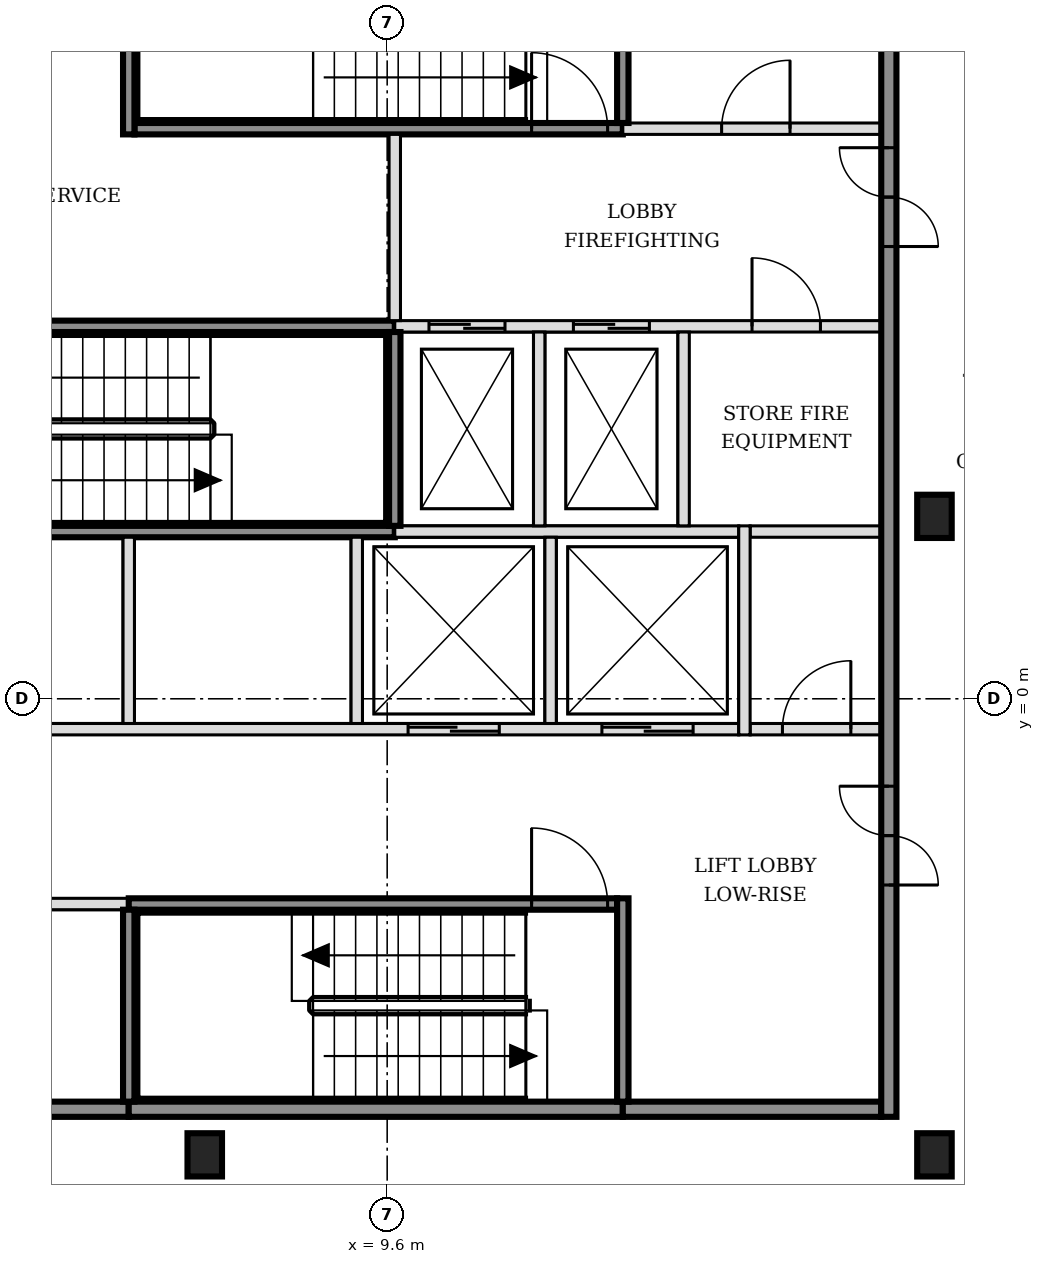
"""IFC4 building model, lengths in metres.
Left out: names, types, materials, properties, quantities, classifications, styles, units other than length and angle.
Written with IfcOpenShell. Run it as: python <this file> out.ifc"""

import sys

from ifc_helpers import new_model, si_unit, direction, frame, frame_2d, origin, origin_2d, place, context, subcontext, project, spatial, rectangle, i_section, extrude, element, fill, save


model = new_model("IFC4")
c1 = context("Model", 3, precision=1e-05, world=origin(), true_north=direction((0.0, 1.0)))
c2 = subcontext(c1, "Body", "Model", "MODEL_VIEW")
j1 = project(units=[si_unit("LENGTHUNIT", "METRE"), si_unit("PLANEANGLEUNIT", "RADIAN")], contexts=[c1])
p1 = place(None, origin())
s1 = spatial("IfcSite", under=j1, at=p1, CompositionType="ELEMENT")
p2 = place(p1, origin())
s2 = spatial("IfcBuilding", under=s1, at=p2, CompositionType="ELEMENT")
p3 = place(p2, frame((0.0, 0.0, 54.6)))
s3 = spatial("IfcBuildingStorey", under=s2, at=p3, CompositionType="ELEMENT", Elevation=54.6)
for number, where, z_axis, x_axis in (
    (1, (7.2, -6.0, -0.15), (0.0, 0.0, 1.0), (1.0, 0.0, 0.0)),
    (2, (16.8, -6.0, -0.15), (0.0, 0.0, 1.0), (1.0, 0.0, 0.0)),
    (3, (16.8, 2.4, -0.15), (0.0, 0.0, 1.0), (1.0, 0.0, 0.0)),
):
    element("IfcColumn", number, at=place(p3, frame(where, z_axis=z_axis, x_axis=x_axis)), inside=s3, PredefinedType="COLUMN", context=c2, shape_type="SweptSolid", body=[
        extrude(i_section(OverallWidth=0.454, OverallDepth=0.569, WebThickness=0.078, FlangeThickness=0.125, FilletRadius=0.015, at=origin_2d()), origin(), (0.0, 0.0, 1.0), 3.6),
    ])
p4 = place(p3, frame((-1.7, -5.4, 0.0), z_axis=(0.0, 0.0, 1.0), x_axis=(1.0, 0.0, 0.0)))
e4 = element("IfcWall", 4, at=p4, inside=s3, PredefinedType="SOLIDWALL", context=c2, shape_type="SweptSolid", body=[
    extrude(rectangle(XDim=7.9, YDim=0.2, at=frame_2d((3.95, 0.0))), origin(), (0.0, 0.0, 1.0), 3.45),
])
p5 = place(p3, frame((6.2, -5.4, 0.0), z_axis=(0.0, 0.0, 1.0), x_axis=(1.0, 0.0, 0.0)))
e5 = element("IfcWall", 5, at=p5, inside=s3, PredefinedType="SOLIDWALL", context=c2, shape_type="SweptSolid", body=[
    extrude(rectangle(XDim=6.5, YDim=0.2, at=frame_2d((3.25, 0.0))), origin(), (0.0, 0.0, 1.0), 3.45),
])
p6 = place(p3, frame((12.7, -5.4, 0.0), z_axis=(0.0, 0.0, 1.0), x_axis=(1.0, 0.0, 0.0)))
e6 = element("IfcWall", 6, at=p6, inside=s3, PredefinedType="SOLIDWALL", context=c2, shape_type="SweptSolid", body=[
    extrude(rectangle(XDim=3.4, YDim=0.2, at=frame_2d((1.7, 0.0))), origin(), (0.0, 0.0, 1.0), 3.45),
])
p7 = place(p3, frame((-1.7, -2.7, 0.0), z_axis=(0.0, 0.0, 1.0), x_axis=(1.0, 0.0, 0.0)))
e7 = element("IfcWall", 7, at=p7, inside=s3, PredefinedType="SOLIDWALL", context=c2, shape_type="SweptSolid", body=[
    extrude(rectangle(XDim=7.9, YDim=0.15, at=frame_2d((3.95, 0.0))), origin(), (0.0, 0.0, 1.0), 3.45),
])
p8 = place(p7, frame((0.6, 0.0, 0.0)))
e8 = element("IfcOpeningElement", 8, at=p8, cuts=e7, PredefinedType="OPENING", context=c2, shape_type="SweptSolid", body=[
    extrude(rectangle(XDim=1.1, YDim=2.1, at=frame_2d((0.55, 1.05))), frame((0.0, 0.085, 0.0), z_axis=(0.0, -1.0, 0.0), x_axis=(1.0, 0.0, 0.0)), (0.0, 0.0, 1.0), 0.17),
])
p9 = place(p7, frame((3.1, 0.0, 0.0)))
e9 = element("IfcOpeningElement", 9, at=p9, cuts=e7, PredefinedType="OPENING", context=c2, shape_type="SweptSolid", body=[
    extrude(rectangle(XDim=1.1, YDim=2.1, at=frame_2d((0.55, 1.05))), frame((0.0, 0.085, 0.0), z_axis=(0.0, -1.0, 0.0), x_axis=(1.0, 0.0, 0.0)), (0.0, 0.0, 1.0), 0.17),
])
p10 = place(p3, frame((6.2, -2.7, 0.0), z_axis=(0.0, 0.0, 1.0), x_axis=(1.0, 0.0, 0.0)))
e10 = element("IfcWall", 10, at=p10, inside=s3, PredefinedType="SOLIDWALL", context=c2, shape_type="SweptSolid", body=[
    extrude(rectangle(XDim=6.425, YDim=0.15, at=frame_2d((3.212, 0.0))), origin(), (0.0, 0.0, 1.0), 3.45),
])
p11 = place(p10, frame((5.3, 0.0, 0.0)))
e11 = element("IfcOpeningElement", 11, at=p11, cuts=e10, PredefinedType="OPENING", context=c2, shape_type="SweptSolid", body=[
    extrude(rectangle(XDim=1.0, YDim=2.1, at=frame_2d((0.5, 1.05))), frame((0.0, 0.085, 0.0), z_axis=(0.0, -1.0, 0.0), x_axis=(1.0, 0.0, 0.0)), (0.0, 0.0, 1.0), 0.17),
])
p12 = place(p3, frame((-1.7, -0.4, 0.0), z_axis=(0.0, 0.0, 1.0), x_axis=(1.0, 0.0, 0.0)))
e12 = element("IfcWall", 12, at=p12, inside=s3, PredefinedType="SOLIDWALL", context=c2, shape_type="SweptSolid", body=[
    extrude(rectangle(XDim=15.925, YDim=0.15, at=frame_2d((7.962, 0.0))), origin(), (0.0, 0.0, 1.0), 3.45),
])
p13 = place(p12, frame((0.6, 0.0, 0.0)))
e13 = element("IfcOpeningElement", 13, at=p13, cuts=e12, PredefinedType="OPENING", context=c2, shape_type="SweptSolid", body=[
    extrude(rectangle(XDim=1.1, YDim=2.1, at=frame_2d((0.55, 1.05))), frame((0.0, 0.085, 0.0), z_axis=(0.0, -1.0, 0.0), x_axis=(1.0, 0.0, 0.0)), (0.0, 0.0, 1.0), 0.17),
])
p14 = place(p12, frame((3.1, 0.0, 0.0)))
e14 = element("IfcOpeningElement", 14, at=p14, cuts=e12, PredefinedType="OPENING", context=c2, shape_type="SweptSolid", body=[
    extrude(rectangle(XDim=1.1, YDim=2.1, at=frame_2d((0.55, 1.05))), frame((0.0, 0.085, 0.0), z_axis=(0.0, -1.0, 0.0), x_axis=(1.0, 0.0, 0.0)), (0.0, 0.0, 1.0), 0.17),
])
p15 = place(p12, frame((11.575, 0.0, 0.0)))
e15 = element("IfcOpeningElement", 15, at=p15, cuts=e12, PredefinedType="OPENING", context=c2, shape_type="SweptSolid", body=[
    extrude(rectangle(XDim=1.2, YDim=2.1, at=frame_2d((0.6, 1.05))), frame((0.0, 0.085, 0.0), z_axis=(0.0, -1.0, 0.0), x_axis=(1.0, 0.0, 0.0)), (0.0, 0.0, 1.0), 0.17),
])
p16 = place(p12, frame((14.125, 0.0, 0.0)))
e16 = element("IfcOpeningElement", 16, at=p16, cuts=e12, PredefinedType="OPENING", context=c2, shape_type="SweptSolid", body=[
    extrude(rectangle(XDim=1.2, YDim=2.1, at=frame_2d((0.6, 1.05))), frame((0.0, 0.085, 0.0), z_axis=(0.0, -1.0, 0.0), x_axis=(1.0, 0.0, 0.0)), (0.0, 0.0, 1.0), 0.17),
])
p17 = place(p3, frame((14.375, -0.4, 0.0), z_axis=(0.0, 0.0, 1.0), x_axis=(1.0, 0.0, 0.0)))
e17 = element("IfcWall", 17, at=p17, inside=s3, PredefinedType="PARTITIONING", context=c2, shape_type="SweptSolid", body=[
    extrude(rectangle(XDim=1.725, YDim=0.15, at=frame_2d((0.863, 0.0))), origin(), (0.0, 0.0, 1.0), 3.45),
])
p18 = place(p17, frame((0.425, 0.0, 0.0)))
e18 = element("IfcOpeningElement", 18, at=p18, cuts=e17, PredefinedType="OPENING", context=c2, shape_type="SweptSolid", body=[
    extrude(rectangle(XDim=0.9, YDim=2.1, at=frame_2d((0.45, 1.05))), frame((0.0, 0.085, 0.0), z_axis=(0.0, -1.0, 0.0), x_axis=(1.0, 0.0, 0.0)), (0.0, 0.0, 1.0), 0.17),
])
p19 = place(p3, frame((3.2, 2.2, 0.0), z_axis=(0.0, 0.0, 1.0), x_axis=(1.0, 0.0, 0.0)))
e19 = element("IfcWall", 19, at=p19, inside=s3, PredefinedType="SOLIDWALL", context=c2, shape_type="SweptSolid", body=[
    extrude(rectangle(XDim=6.5, YDim=0.15, at=frame_2d((3.25, 0.0))), origin(), (0.0, 0.0, 1.0), 3.45),
])
p20 = place(p3, frame((9.7, 2.2, 0.0), z_axis=(0.0, 0.0, 1.0), x_axis=(1.0, 0.0, 0.0)))
e20 = element("IfcWall", 20, at=p20, inside=s3, PredefinedType="SOLIDWALL", context=c2, shape_type="SweptSolid", body=[
    extrude(rectangle(XDim=4.525, YDim=0.15, at=frame_2d((2.263, 0.0))), origin(), (0.0, 0.0, 1.0), 3.45),
])
p21 = place(p3, frame((14.375, 2.2, 0.0), z_axis=(0.0, 0.0, 1.0), x_axis=(1.0, 0.0, 0.0)))
e21 = element("IfcWall", 21, at=p21, inside=s3, PredefinedType="PARTITIONING", context=c2, shape_type="SweptSolid", body=[
    extrude(rectangle(XDim=1.725, YDim=0.15, at=frame_2d((0.863, 0.0))), origin(), (0.0, 0.0, 1.0), 3.45),
])
p22 = place(p3, frame((3.275, 4.9, 0.0), z_axis=(0.0, 0.0, 1.0), x_axis=(1.0, 0.0, 0.0)))
e22 = element("IfcWall", 22, at=p22, inside=s3, PredefinedType="SOLIDWALL", context=c2, shape_type="SweptSolid", body=[
    extrude(rectangle(XDim=6.425, YDim=0.15, at=frame_2d((3.212, 0.0))), origin(), (0.0, 0.0, 1.0), 3.45),
])
p23 = place(p22, frame((0.1, 0.0, 0.0)))
e23 = element("IfcOpeningElement", 23, at=p23, cuts=e22, PredefinedType="OPENING", context=c2, shape_type="SweptSolid", body=[
    extrude(rectangle(XDim=1.0, YDim=2.1, at=frame_2d((0.5, 1.05))), frame((0.0, 0.085, 0.0), z_axis=(0.0, -1.0, 0.0), x_axis=(1.0, 0.0, 0.0)), (0.0, 0.0, 1.0), 0.17),
])
p24 = place(p3, frame((9.7, 4.9, 0.0), z_axis=(0.0, 0.0, 1.0), x_axis=(1.0, 0.0, 0.0)))
e24 = element("IfcWall", 24, at=p24, inside=s3, PredefinedType="SOLIDWALL", context=c2, shape_type="SweptSolid", body=[
    extrude(rectangle(XDim=6.4, YDim=0.15, at=frame_2d((3.2, 0.0))), origin(), (0.0, 0.0, 1.0), 3.45),
])
p25 = place(p24, frame((0.45, 0.0, 0.0)))
e25 = element("IfcOpeningElement", 25, at=p25, cuts=e24, PredefinedType="OPENING", context=c2, shape_type="SweptSolid", body=[
    extrude(rectangle(XDim=1.0, YDim=2.1, at=frame_2d((0.5, 1.05))), frame((0.0, 0.085, 0.0), z_axis=(0.0, -1.0, 0.0), x_axis=(1.0, 0.0, 0.0)), (0.0, 0.0, 1.0), 0.17),
])
p26 = place(p24, frame((2.35, 0.0, 0.0)))
e26 = element("IfcOpeningElement", 26, at=p26, cuts=e24, PredefinedType="OPENING", context=c2, shape_type="SweptSolid", body=[
    extrude(rectangle(XDim=1.0, YDim=2.1, at=frame_2d((0.5, 1.05))), frame((0.0, 0.085, 0.0), z_axis=(0.0, -1.0, 0.0), x_axis=(1.0, 0.0, 0.0)), (0.0, 0.0, 1.0), 0.17),
])
p27 = place(p24, frame((4.7, 0.0, 0.0)))
e27 = element("IfcOpeningElement", 27, at=p27, cuts=e24, PredefinedType="OPENING", context=c2, shape_type="SweptSolid", body=[
    extrude(rectangle(XDim=0.9, YDim=2.1, at=frame_2d((0.45, 1.05))), frame((0.0, 0.085, 0.0), z_axis=(0.0, -1.0, 0.0), x_axis=(1.0, 0.0, 0.0)), (0.0, 0.0, 1.0), 0.17),
])
p28 = place(p3, frame((6.275, 7.5, 0.0), z_axis=(0.0, 0.0, 1.0), x_axis=(1.0, 0.0, 0.0)))
e28 = element("IfcWall", 28, at=p28, inside=s3, PredefinedType="SOLIDWALL", context=c2, shape_type="SweptSolid", body=[
    extrude(rectangle(XDim=6.425, YDim=0.15, at=frame_2d((3.212, 0.0))), origin(), (0.0, 0.0, 1.0), 3.45),
])
p29 = place(p28, frame((5.225, 0.0, 0.0)))
e29 = element("IfcOpeningElement", 29, at=p29, cuts=e28, PredefinedType="OPENING", context=c2, shape_type="SweptSolid", body=[
    extrude(rectangle(XDim=1.0, YDim=2.1, at=frame_2d((0.5, 1.05))), frame((0.0, 0.085, 0.0), z_axis=(0.0, -1.0, 0.0), x_axis=(1.0, 0.0, 0.0)), (0.0, 0.0, 1.0), 0.17),
])
p30 = place(p3, frame((12.7, 7.5, 0.0), z_axis=(0.0, 0.0, 1.0), x_axis=(1.0, 0.0, 0.0)))
e30 = element("IfcWall", 30, at=p30, inside=s3, PredefinedType="SOLIDWALL", context=c2, shape_type="SweptSolid", body=[
    extrude(rectangle(XDim=3.4, YDim=0.15, at=frame_2d((1.7, 0.0))), origin(), (0.0, 0.0, 1.0), 3.45),
])
p31 = place(p30, frame((1.3, 0.0, 0.0)))
e31 = element("IfcOpeningElement", 31, at=p31, cuts=e30, PredefinedType="OPENING", context=c2, shape_type="SweptSolid", body=[
    extrude(rectangle(XDim=0.9, YDim=2.1, at=frame_2d((0.45, 1.05))), frame((0.0, 0.085, 0.0), z_axis=(0.0, -1.0, 0.0), x_axis=(1.0, 0.0, 0.0)), (0.0, 0.0, 1.0), 0.17),
])
p32 = place(p3, frame((6.2, -5.3, 0.0), z_axis=(0.0, 0.0, 1.0), x_axis=(0.0, 1.0, 0.0)))
e32 = element("IfcWall", 32, at=p32, inside=s3, PredefinedType="SOLIDWALL", context=c2, shape_type="SweptSolid", body=[
    extrude(rectangle(XDim=2.525, YDim=0.15, at=frame_2d((1.263, 0.0))), origin(), (0.0, 0.0, 1.0), 3.45),
])
p33 = place(p3, frame((6.2, -0.325, 0.0), z_axis=(0.0, 0.0, 1.0), x_axis=(0.0, 1.0, 0.0)))
e33 = element("IfcWall", 33, at=p33, inside=s3, PredefinedType="SOLIDWALL", context=c2, shape_type="SweptSolid", body=[
    extrude(rectangle(XDim=2.45, YDim=0.15, at=frame_2d((1.225, 0.0))), origin(), (0.0, 0.0, 1.0), 3.45),
])
p34 = place(p3, frame((6.2, 7.425, 0.0), z_axis=(0.0, 0.0, 1.0), x_axis=(0.0, 1.0, 0.0)))
e34 = element("IfcWall", 34, at=p34, inside=s3, PredefinedType="SOLIDWALL", context=c2, shape_type="SweptSolid", body=[
    extrude(rectangle(XDim=2.675, YDim=0.15, at=frame_2d((1.337, 0.0))), origin(), (0.0, 0.0, 1.0), 3.45),
])
p35 = place(p3, frame((9.2, -0.325, 0.0), z_axis=(0.0, 0.0, 1.0), x_axis=(0.0, 1.0, 0.0)))
e35 = element("IfcWall", 35, at=p35, inside=s3, PredefinedType="SOLIDWALL", context=c2, shape_type="SweptSolid", body=[
    extrude(rectangle(XDim=2.45, YDim=0.15, at=frame_2d((1.225, 0.0))), origin(), (0.0, 0.0, 1.0), 3.45),
])
p36 = place(p3, frame((9.7, 2.275, 0.0), z_axis=(0.0, 0.0, 1.0), x_axis=(0.0, 1.0, 0.0)))
e36 = element("IfcWall", 36, at=p36, inside=s3, PredefinedType="SOLIDWALL", context=c2, shape_type="SweptSolid", body=[
    extrude(rectangle(XDim=2.55, YDim=0.15, at=frame_2d((1.275, 0.0))), origin(), (0.0, 0.0, 1.0), 3.45),
])
p37 = place(p3, frame((9.7, 4.975, 0.0), z_axis=(0.0, 0.0, 1.0), x_axis=(0.0, 1.0, 0.0)))
e37 = element("IfcWall", 37, at=p37, inside=s3, PredefinedType="SOLIDWALL", context=c2, shape_type="SweptSolid", body=[
    extrude(rectangle(XDim=2.45, YDim=0.15, at=frame_2d((1.225, 0.0))), origin(), (0.0, 0.0, 1.0), 3.45),
])
p38 = place(p3, frame((11.6, 2.275, 0.0), z_axis=(0.0, 0.0, 1.0), x_axis=(0.0, 1.0, 0.0)))
e38 = element("IfcWall", 38, at=p38, inside=s3, PredefinedType="SOLIDWALL", context=c2, shape_type="SweptSolid", body=[
    extrude(rectangle(XDim=2.55, YDim=0.15, at=frame_2d((1.275, 0.0))), origin(), (0.0, 0.0, 1.0), 3.45),
])
p39 = place(p3, frame((11.75, -0.325, 0.0), z_axis=(0.0, 0.0, 1.0), x_axis=(0.0, 1.0, 0.0)))
e39 = element("IfcWall", 39, at=p39, inside=s3, PredefinedType="SOLIDWALL", context=c2, shape_type="SweptSolid", body=[
    extrude(rectangle(XDim=2.45, YDim=0.15, at=frame_2d((1.225, 0.0))), origin(), (0.0, 0.0, 1.0), 3.45),
])
p40 = place(p3, frame((12.7, -5.3, 0.0), z_axis=(0.0, 0.0, 1.0), x_axis=(0.0, 1.0, 0.0)))
e40 = element("IfcWall", 40, at=p40, inside=s3, PredefinedType="SOLIDWALL", context=c2, shape_type="SweptSolid", body=[
    extrude(rectangle(XDim=2.675, YDim=0.15, at=frame_2d((1.337, 0.0))), origin(), (0.0, 0.0, 1.0), 3.45),
])
p41 = place(p3, frame((12.7, 7.575, 0.0), z_axis=(0.0, 0.0, 1.0), x_axis=(0.0, 1.0, 0.0)))
e41 = element("IfcWall", 41, at=p41, inside=s3, PredefinedType="SOLIDWALL", context=c2, shape_type="SweptSolid", body=[
    extrude(rectangle(XDim=2.525, YDim=0.15, at=frame_2d((1.263, 0.0))), origin(), (0.0, 0.0, 1.0), 3.45),
])
p42 = place(p3, frame((13.5, 2.275, 0.0), z_axis=(0.0, 0.0, 1.0), x_axis=(0.0, 1.0, 0.0)))
e42 = element("IfcWall", 42, at=p42, inside=s3, PredefinedType="SOLIDWALL", context=c2, shape_type="SweptSolid", body=[
    extrude(rectangle(XDim=2.55, YDim=0.15, at=frame_2d((1.275, 0.0))), origin(), (0.0, 0.0, 1.0), 3.45),
])
p43 = place(p3, frame((14.3, -0.475, 0.0), z_axis=(0.0, 0.0, 1.0), x_axis=(0.0, 1.0, 0.0)))
e43 = element("IfcWall", 43, at=p43, inside=s3, PredefinedType="SOLIDWALL", context=c2, shape_type="SweptSolid", body=[
    extrude(rectangle(XDim=2.75, YDim=0.15, at=frame_2d((1.375, 0.0))), origin(), (0.0, 0.0, 1.0), 3.45),
])
p44 = place(p3, frame((16.2, -5.5, 0.0), z_axis=(0.0, 0.0, 1.0), x_axis=(0.0, 1.0, 0.0)))
e44 = element("IfcWall", 44, at=p44, inside=s3, PredefinedType="SOLIDWALL", context=c2, shape_type="SweptSolid", body=[
    extrude(rectangle(XDim=15.8, YDim=0.2, at=frame_2d((7.9, 0.0))), origin(), (0.0, 0.0, 1.0), 3.45),
])
p45 = place(p44, frame((3.05, 0.0, 0.0)))
e45 = element("IfcOpeningElement", 45, at=p45, cuts=e44, PredefinedType="OPENING", context=c2, shape_type="SweptSolid", body=[
    extrude(rectangle(XDim=1.3, YDim=2.1, at=frame_2d((0.65, 1.05))), frame((0.0, 0.11, 0.0), z_axis=(0.0, -1.0, 0.0), x_axis=(1.0, 0.0, 0.0)), (0.0, 0.0, 1.0), 0.22),
])
p46 = place(p44, frame((11.45, 0.0, 0.0)))
e46 = element("IfcOpeningElement", 46, at=p46, cuts=e44, PredefinedType="OPENING", context=c2, shape_type="SweptSolid", body=[
    extrude(rectangle(XDim=1.3, YDim=2.1, at=frame_2d((0.65, 1.05))), frame((0.0, 0.11, 0.0), z_axis=(0.0, -1.0, 0.0), x_axis=(1.0, 0.0, 0.0)), (0.0, 0.0, 1.0), 0.22),
])
p47 = place(p15, origin())
e47 = element("IfcDoor", 47, at=p47, inside=s3, OperationType="DOUBLE_DOOR_SLIDING", PredefinedType="DOOR", context=c2, shape_type="SweptSolid", body=[
    extrude(rectangle(XDim=1.2, YDim=2.1, at=frame_2d((0.6, 1.05))), frame((0.0, 0.025, 0.0), z_axis=(0.0, -1.0, 0.0), x_axis=(1.0, 0.0, 0.0)), (0.0, 0.0, 1.0), 0.05),
])
fill(e15, e47)
p48 = place(p16, origin())
e48 = element("IfcDoor", 48, at=p48, inside=s3, OperationType="DOUBLE_DOOR_SLIDING", PredefinedType="DOOR", context=c2, shape_type="SweptSolid", body=[
    extrude(rectangle(XDim=1.2, YDim=2.1, at=frame_2d((0.6, 1.05))), frame((0.0, 0.025, 0.0), z_axis=(0.0, -1.0, 0.0), x_axis=(1.0, 0.0, 0.0)), (0.0, 0.0, 1.0), 0.05),
])
fill(e16, e48)
p49 = place(p25, origin())
e49 = element("IfcDoor", 49, at=p49, inside=s3, OperationType="DOUBLE_DOOR_SLIDING", PredefinedType="DOOR", context=c2, shape_type="SweptSolid", body=[
    extrude(rectangle(XDim=1.0, YDim=2.1, at=frame_2d((0.5, 1.05))), frame((0.0, 0.025, 0.0), z_axis=(0.0, -1.0, 0.0), x_axis=(1.0, 0.0, 0.0)), (0.0, 0.0, 1.0), 0.05),
])
fill(e25, e49)
p50 = place(p26, origin())
e50 = element("IfcDoor", 50, at=p50, inside=s3, OperationType="DOUBLE_DOOR_SLIDING", PredefinedType="DOOR", context=c2, shape_type="SweptSolid", body=[
    extrude(rectangle(XDim=1.0, YDim=2.1, at=frame_2d((0.5, 1.05))), frame((0.0, 0.025, 0.0), z_axis=(0.0, -1.0, 0.0), x_axis=(1.0, 0.0, 0.0)), (0.0, 0.0, 1.0), 0.05),
])
fill(e26, e50)
p51 = place(p11, origin())
e51 = element("IfcDoor", 51, at=p51, inside=s3, OperationType="SINGLE_SWING_LEFT", PredefinedType="DOOR", context=c2, shape_type="SweptSolid", body=[
    extrude(rectangle(XDim=1.0, YDim=2.1, at=frame_2d((0.5, 1.05))), frame((0.0, 0.025, 0.0), z_axis=(0.0, -1.0, 0.0), x_axis=(1.0, 0.0, 0.0)), (0.0, 0.0, 1.0), 0.05),
])
fill(e11, e51)
p52 = place(p29, origin())
e52 = element("IfcDoor", 52, at=p52, inside=s3, OperationType="SINGLE_SWING_LEFT", PredefinedType="DOOR", context=c2, shape_type="SweptSolid", body=[
    extrude(rectangle(XDim=1.0, YDim=2.1, at=frame_2d((0.5, 1.05))), frame((0.0, 0.025, 0.0), z_axis=(0.0, -1.0, 0.0), x_axis=(1.0, 0.0, 0.0)), (0.0, 0.0, 1.0), 0.05),
])
fill(e29, e52)
p53 = place(p45, origin())
e53 = element("IfcDoor", 53, at=p53, inside=s3, OperationType="DOUBLE_DOOR_SINGLE_SWING", PredefinedType="DOOR", context=c2, shape_type="SweptSolid", body=[
    extrude(rectangle(XDim=1.3, YDim=2.1, at=frame_2d((0.65, 1.05))), frame((0.0, 0.025, 0.0), z_axis=(0.0, -1.0, 0.0), x_axis=(1.0, 0.0, 0.0)), (0.0, 0.0, 1.0), 0.05),
])
fill(e45, e53)
p54 = place(p46, origin())
e54 = element("IfcDoor", 54, at=p54, inside=s3, OperationType="DOUBLE_DOOR_SINGLE_SWING", PredefinedType="DOOR", context=c2, shape_type="SweptSolid", body=[
    extrude(rectangle(XDim=1.3, YDim=2.1, at=frame_2d((0.65, 1.05))), frame((0.0, 0.025, 0.0), z_axis=(0.0, -1.0, 0.0), x_axis=(1.0, 0.0, 0.0)), (0.0, 0.0, 1.0), 0.05),
])
fill(e46, e54)
p55 = place(p18, origin())
e55 = element("IfcDoor", 55, at=p55, inside=s3, OperationType="SINGLE_SWING_RIGHT", PredefinedType="DOOR", context=c2, shape_type="SweptSolid", body=[
    extrude(rectangle(XDim=0.9, YDim=2.1, at=frame_2d((0.45, 1.05))), frame((0.0, 0.025, 0.0), z_axis=(0.0, -1.0, 0.0), x_axis=(1.0, 0.0, 0.0)), (0.0, 0.0, 1.0), 0.05),
])
fill(e18, e55)
p56 = place(p27, origin())
e56 = element("IfcDoor", 56, at=p56, inside=s3, OperationType="SINGLE_SWING_LEFT", PredefinedType="DOOR", context=c2, shape_type="SweptSolid", body=[
    extrude(rectangle(XDim=0.9, YDim=2.1, at=frame_2d((0.45, 1.05))), frame((0.0, 0.025, 0.0), z_axis=(0.0, -1.0, 0.0), x_axis=(1.0, 0.0, 0.0)), (0.0, 0.0, 1.0), 0.05),
])
fill(e27, e56)
p57 = place(p31, origin())
e57 = element("IfcDoor", 57, at=p57, inside=s3, OperationType="SINGLE_SWING_RIGHT", PredefinedType="DOOR", context=c2, shape_type="SweptSolid", body=[
    extrude(rectangle(XDim=0.9, YDim=2.1, at=frame_2d((0.45, 1.05))), frame((0.0, 0.025, 0.0), z_axis=(0.0, -1.0, 0.0), x_axis=(1.0, 0.0, 0.0)), (0.0, 0.0, 1.0), 0.05),
])
fill(e31, e57)
save(model, sys.argv[1])
